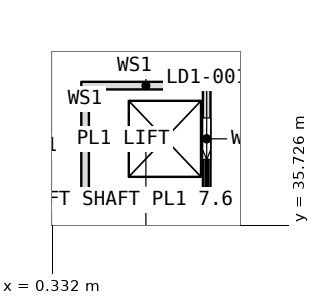
"""IFC4 building model, lengths in metres.
Left out: names, types, materials, properties, quantities, classifications, styles, units other than length and angle.
Written with IfcOpenShell. Run it as: python <this file> out.ifc"""

import sys

from ifc_helpers import new_model, si_unit, direction, frame, frame_2d, origin, place, context, subcontext, project, spatial, rectangle, extrude, element, fill, save


model = new_model("IFC4")
c1 = context("Model", 3, precision=1e-05, world=origin(), true_north=direction((0.0, 1.0)))
c2 = subcontext(c1, "Body", "Model", "MODEL_VIEW")
j1 = project(units=[si_unit("LENGTHUNIT", "METRE"), si_unit("PLANEANGLEUNIT", "RADIAN")], contexts=[c1])
p1 = place(None, origin())
s1 = spatial("IfcSite", under=j1, at=p1, CompositionType="ELEMENT")
p2 = place(p1, origin())
s2 = spatial("IfcBuilding", under=s1, at=p2, CompositionType="ELEMENT")
p3 = place(p2, frame((0.0, 0.0, -9.9)))
s3 = spatial("IfcBuildingStorey", under=s2, at=p3, CompositionType="ELEMENT", Elevation=-9.9)
for number, where, z_axis, x_axis in (
    (1, (1.1, 36.6, 0.0), (0.0, 0.0, 1.0), (1.0, 0.0, 0.0)),
    (2, (1.1, 39.4, 0.0), (0.0, 0.0, 1.0), (1.0, 0.0, 0.0)),
):
    element("IfcWall", number, at=place(p3, frame(where, z_axis=z_axis, x_axis=x_axis)), inside=s3, PredefinedType="PARTITIONING", context=c2, shape_type="SweptSolid", body=[
        extrude(rectangle(XDim=3.4, YDim=0.2, at=frame_2d((1.7, 0.0))), origin(), (0.0, 0.0, 1.0), 2.4),
    ])
p4 = place(p3, frame((1.2, 36.7, 0.0), z_axis=(0.0, 0.0, 1.0), x_axis=(0.0, 1.0, 0.0)))
e3 = element("IfcWall", 3, at=p4, inside=s3, PredefinedType="PARTITIONING", context=c2, shape_type="SweptSolid", body=[
    extrude(rectangle(XDim=2.6, YDim=0.2, at=frame_2d((1.3, 0.0))), origin(), (0.0, 0.0, 1.0), 2.4),
])
p5 = place(p3, frame((4.4, 36.7, 0.0), z_axis=(0.0, 0.0, 1.0), x_axis=(0.0, 1.0, 0.0)))
e4 = element("IfcWall", 4, at=p5, inside=s3, PredefinedType="PARTITIONING", context=c2, shape_type="SweptSolid", body=[
    extrude(rectangle(XDim=2.6, YDim=0.2, at=frame_2d((1.3, 0.0))), origin(), (0.0, 0.0, 1.0), 2.4),
])
p6 = place(p5, frame((0.75, 0.0, 0.0)))
e5 = element("IfcOpeningElement", 5, at=p6, cuts=e4, PredefinedType="OPENING", context=c2, shape_type="SweptSolid", body=[
    extrude(rectangle(XDim=1.1, YDim=2.1, at=frame_2d((0.55, 1.05))), frame((0.0, 0.11, 0.0), z_axis=(0.0, -1.0, 0.0), x_axis=(1.0, 0.0, 0.0)), (0.0, 0.0, 1.0), 0.22),
])
p7 = place(p6, origin())
e6 = element("IfcDoor", 6, at=p7, inside=s3, OperationType="SLIDING_TO_LEFT", PredefinedType="USERDEFINED", context=c2, shape_type="SweptSolid", body=[
    extrude(rectangle(XDim=1.1, YDim=2.1, at=frame_2d((0.55, 1.05))), frame((0.0, 0.025, 0.0), z_axis=(0.0, -1.0, 0.0), x_axis=(1.0, 0.0, 0.0)), (0.0, 0.0, 1.0), 0.05),
])
fill(e5, e6)
save(model, sys.argv[1])
